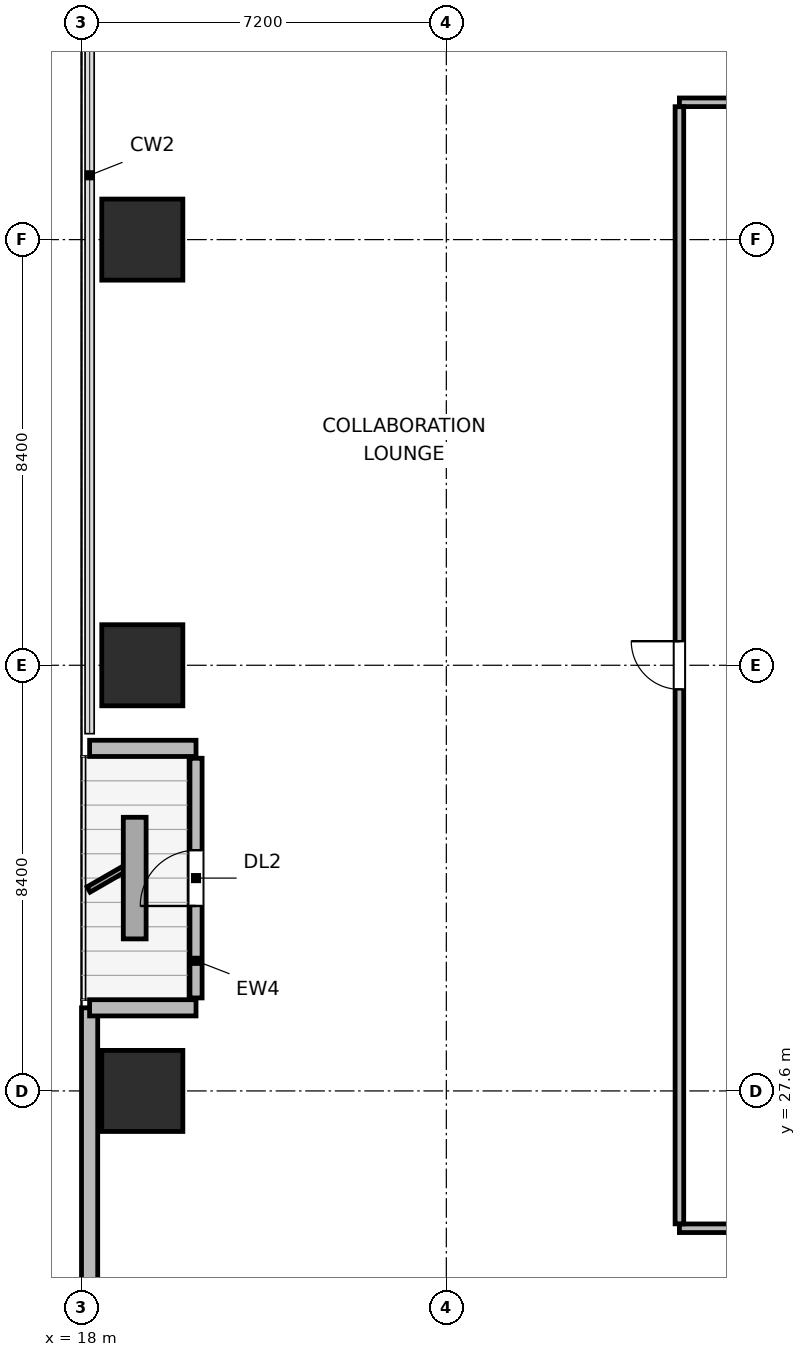
"""IFC4 building model, lengths in metres.
Left out: names, types, materials, properties, quantities, classifications, styles, units other than length and angle.
Written with IfcOpenShell. Run it as: python <this file> out.ifc"""

import sys

from ifc_helpers import new_model, si_unit, direction, frame, frame_2d, origin, origin_2d, place, context, subcontext, project, spatial, rectangle, extrude, element, fill, save


model = new_model("IFC4")
c1 = context("Model", 3, precision=1e-05, world=origin(), true_north=direction((0.0, 1.0)))
c2 = subcontext(c1, "Body", "Model", "MODEL_VIEW")
j1 = project(units=[si_unit("LENGTHUNIT", "METRE"), si_unit("PLANEANGLEUNIT", "RADIAN")], contexts=[c1])
p1 = place(None, origin())
s1 = spatial("IfcSite", under=j1, at=p1, CompositionType="ELEMENT")
p2 = place(p1, origin())
s2 = spatial("IfcBuilding", under=s1, at=p2, CompositionType="ELEMENT")
p3 = place(p2, frame((0.0, 0.0, 45.0)))
s3 = spatial("IfcBuildingStorey", under=s2, at=p3, CompositionType="ELEMENT", Elevation=45.0)
for number, where, z_axis, x_axis in (
    (1, (19.2, 27.6, 0.0), (0.0, 0.0, 1.0), (1.0, 0.0, 0.0)),
    (2, (19.2, 36.0, 0.0), (0.0, 0.0, 1.0), (1.0, 0.0, 0.0)),
    (3, (19.2, 44.4, 0.0), (0.0, 0.0, 1.0), (1.0, 0.0, 0.0)),
):
    element("IfcColumn", number, at=place(p3, frame(where, z_axis=z_axis, x_axis=x_axis)), inside=s3, PredefinedType="COLUMN", context=c2, shape_type="SweptSolid", body=[
        extrude(rectangle(XDim=1.6, YDim=1.6, at=origin_2d()), origin(), (0.0, 0.0, 1.0), 3.9),
    ])
p4 = place(p3, frame((18.16, 15.021, 0.0), z_axis=(0.0, 0.0, 1.0), x_axis=(0.0, 1.0, 0.0)))
e4 = element("IfcWall", 4, at=p4, inside=s3, PredefinedType="SOLIDWALL", context=c2, shape_type="SweptSolid", body=[
    extrude(rectangle(XDim=14.219, YDim=0.32, at=frame_2d((7.109, 0.0))), origin(), (0.0, 0.0, 1.0), 3.64),
])
p5 = place(p3, frame((18.16, 29.24, 0.0), z_axis=(0.0, 0.0, 1.0), x_axis=(1.0, 0.0, 0.0)))
e5 = element("IfcWall", 5, at=p5, inside=s3, PredefinedType="SOLIDWALL", context=c2, shape_type="SweptSolid", body=[
    extrude(rectangle(XDim=2.1, YDim=0.32, at=frame_2d((1.05, 0.0))), origin(), (0.0, 0.0, 1.0), 2.875),
])
p6 = place(p3, frame((20.26, 29.435, 0.0), z_axis=(0.0, 0.0, 1.0), x_axis=(0.0, 1.0, 0.0)))
e6 = element("IfcWall", 6, at=p6, inside=s3, PredefinedType="SOLIDWALL", context=c2, shape_type="SweptSolid", body=[
    extrude(rectangle(XDim=4.73, YDim=0.24, at=frame_2d((2.365, 0.0))), origin(), (0.0, 0.0, 1.0), 3.162),
])
p7 = place(p6, frame((1.815, 0.0, 0.0)))
e7 = element("IfcOpeningElement", 7, at=p7, cuts=e6, PredefinedType="OPENING", context=c2, shape_type="SweptSolid", body=[
    extrude(rectangle(XDim=1.1, YDim=2.04, at=frame_2d((0.55, 1.02))), frame((0.0, 0.13, 0.0), z_axis=(0.0, -1.0, 0.0), x_axis=(1.0, 0.0, 0.0)), (0.0, 0.0, 1.0), 0.26),
])
p8 = place(p3, frame((20.26, 34.36, 0.0), z_axis=(0.0, 0.0, 1.0), x_axis=(-1.0, 0.0, 0.0)))
e8 = element("IfcWall", 8, at=p8, inside=s3, PredefinedType="SOLIDWALL", context=c2, shape_type="SweptSolid", body=[
    extrude(rectangle(XDim=2.1, YDim=0.32, at=frame_2d((1.05, 0.0))), origin(), (0.0, 0.0, 1.0), 2.875),
])
p9 = place(p3, frame((29.8, 24.89, 0.0), z_axis=(0.0, 0.0, 1.0), x_axis=(1.0, 0.0, 0.0)))
e9 = element("IfcWall", 9, at=p9, inside=s3, PredefinedType="PARTITIONING", context=c2, shape_type="SweptSolid", body=[
    extrude(rectangle(XDim=36.4, YDim=0.17, at=frame_2d((18.2, 0.0))), origin(), (0.0, 0.0, 1.0), 3.64),
])
p10 = place(p9, frame((2.555, 0.0, 0.0)))
e10 = element("IfcOpeningElement", 10, at=p10, cuts=e9, PredefinedType="OPENING", context=c2, shape_type="SweptSolid", body=[
    extrude(rectangle(XDim=0.95, YDim=2.04, at=frame_2d((0.475, 1.02))), frame((0.0, 0.095, 0.0), z_axis=(0.0, -1.0, 0.0), x_axis=(1.0, 0.0, 0.0)), (0.0, 0.0, 1.0), 0.19),
])
p11 = place(p9, frame((8.01, 0.0, 0.0)))
e11 = element("IfcOpeningElement", 11, at=p11, cuts=e9, PredefinedType="OPENING", context=c2, shape_type="SweptSolid", body=[
    extrude(rectangle(XDim=0.95, YDim=2.04, at=frame_2d((0.475, 1.02))), frame((0.0, 0.095, 0.0), z_axis=(0.0, -1.0, 0.0), x_axis=(1.0, 0.0, 0.0)), (0.0, 0.0, 1.0), 0.19),
])
p12 = place(p9, frame((13.18, 0.0, 0.0)))
e12 = element("IfcOpeningElement", 12, at=p12, cuts=e9, PredefinedType="OPENING", context=c2, shape_type="SweptSolid", body=[
    extrude(rectangle(XDim=0.95, YDim=2.04, at=frame_2d((0.475, 1.02))), frame((0.0, 0.095, 0.0), z_axis=(0.0, -1.0, 0.0), x_axis=(1.0, 0.0, 0.0)), (0.0, 0.0, 1.0), 0.19),
])
p13 = place(p9, frame((18.04, 0.0, 0.0)))
e13 = element("IfcOpeningElement", 13, at=p13, cuts=e9, PredefinedType="OPENING", context=c2, shape_type="SweptSolid", body=[
    extrude(rectangle(XDim=0.95, YDim=2.04, at=frame_2d((0.475, 1.02))), frame((0.0, 0.095, 0.0), z_axis=(0.0, -1.0, 0.0), x_axis=(1.0, 0.0, 0.0)), (0.0, 0.0, 1.0), 0.19),
])
p14 = place(p9, frame((22.585, 0.0, 0.0)))
e14 = element("IfcOpeningElement", 14, at=p14, cuts=e9, PredefinedType="OPENING", context=c2, shape_type="SweptSolid", body=[
    extrude(rectangle(XDim=0.95, YDim=2.04, at=frame_2d((0.475, 1.02))), frame((0.0, 0.095, 0.0), z_axis=(0.0, -1.0, 0.0), x_axis=(1.0, 0.0, 0.0)), (0.0, 0.0, 1.0), 0.19),
])
p15 = place(p9, frame((27.44, 0.0, 0.0)))
e15 = element("IfcOpeningElement", 15, at=p15, cuts=e9, PredefinedType="OPENING", context=c2, shape_type="SweptSolid", body=[
    extrude(rectangle(XDim=0.95, YDim=2.04, at=frame_2d((0.475, 1.02))), frame((0.0, 0.095, 0.0), z_axis=(0.0, -1.0, 0.0), x_axis=(1.0, 0.0, 0.0)), (0.0, 0.0, 1.0), 0.19),
])
p16 = place(p9, frame((32.895, 0.0, 0.0)))
e16 = element("IfcOpeningElement", 16, at=p16, cuts=e9, PredefinedType="OPENING", context=c2, shape_type="SweptSolid", body=[
    extrude(rectangle(XDim=0.95, YDim=2.04, at=frame_2d((0.475, 1.02))), frame((0.0, 0.095, 0.0), z_axis=(0.0, -1.0, 0.0), x_axis=(1.0, 0.0, 0.0)), (0.0, 0.0, 1.0), 0.19),
])
p17 = place(p3, frame((29.8, 47.11, 0.0), z_axis=(0.0, 0.0, 1.0), x_axis=(1.0, 0.0, 0.0)))
e17 = element("IfcWall", 17, at=p17, inside=s3, PredefinedType="PARTITIONING", context=c2, shape_type="SweptSolid", body=[
    extrude(rectangle(XDim=36.4, YDim=0.17, at=frame_2d((18.2, 0.0))), origin(), (0.0, 0.0, 1.0), 3.64),
])
p18 = place(p17, frame((4.205, 0.0, 0.0)))
e18 = element("IfcOpeningElement", 18, at=p18, cuts=e17, PredefinedType="OPENING", context=c2, shape_type="SweptSolid", body=[
    extrude(rectangle(XDim=0.95, YDim=2.04, at=frame_2d((0.475, 1.02))), frame((0.0, 0.095, 0.0), z_axis=(0.0, -1.0, 0.0), x_axis=(1.0, 0.0, 0.0)), (0.0, 0.0, 1.0), 0.19),
])
p19 = place(p17, frame((10.385, 0.0, 0.0)))
e19 = element("IfcOpeningElement", 19, at=p19, cuts=e17, PredefinedType="OPENING", context=c2, shape_type="SweptSolid", body=[
    extrude(rectangle(XDim=0.95, YDim=2.04, at=frame_2d((0.475, 1.02))), frame((0.0, 0.095, 0.0), z_axis=(0.0, -1.0, 0.0), x_axis=(1.0, 0.0, 0.0)), (0.0, 0.0, 1.0), 0.19),
])
p20 = place(p17, frame((17.005, 0.0, 0.0)))
e20 = element("IfcOpeningElement", 20, at=p20, cuts=e17, PredefinedType="OPENING", context=c2, shape_type="SweptSolid", body=[
    extrude(rectangle(XDim=0.95, YDim=2.04, at=frame_2d((0.475, 1.02))), frame((0.0, 0.095, 0.0), z_axis=(0.0, -1.0, 0.0), x_axis=(1.0, 0.0, 0.0)), (0.0, 0.0, 1.0), 0.19),
])
p21 = place(p17, frame((24.755, 0.0, 0.0)))
e21 = element("IfcOpeningElement", 21, at=p21, cuts=e17, PredefinedType="OPENING", context=c2, shape_type="SweptSolid", body=[
    extrude(rectangle(XDim=0.95, YDim=2.04, at=frame_2d((0.475, 1.02))), frame((0.0, 0.095, 0.0), z_axis=(0.0, -1.0, 0.0), x_axis=(1.0, 0.0, 0.0)), (0.0, 0.0, 1.0), 0.19),
])
p22 = place(p17, frame((31.655, 0.0, 0.0)))
e22 = element("IfcOpeningElement", 22, at=p22, cuts=e17, PredefinedType="OPENING", context=c2, shape_type="SweptSolid", body=[
    extrude(rectangle(XDim=0.95, YDim=2.04, at=frame_2d((0.475, 1.02))), frame((0.0, 0.095, 0.0), z_axis=(0.0, -1.0, 0.0), x_axis=(1.0, 0.0, 0.0)), (0.0, 0.0, 1.0), 0.19),
])
p23 = place(p3, frame((29.8, 24.977, 0.0), z_axis=(0.0, 0.0, 1.0), x_axis=(0.0, 1.0, 0.0)))
e23 = element("IfcWall", 23, at=p23, inside=s3, PredefinedType="PARTITIONING", context=c2, shape_type="SweptSolid", body=[
    extrude(rectangle(XDim=22.046, YDim=0.17, at=frame_2d((11.023, 0.0))), origin(), (0.0, 0.0, 1.0), 3.64),
])
p24 = place(p23, frame((10.548, 0.0, 0.0)))
e24 = element("IfcOpeningElement", 24, at=p24, cuts=e23, PredefinedType="OPENING", context=c2, shape_type="SweptSolid", body=[
    extrude(rectangle(XDim=0.95, YDim=2.04, at=frame_2d((0.475, 1.02))), frame((0.0, 0.095, 0.0), z_axis=(0.0, -1.0, 0.0), x_axis=(1.0, 0.0, 0.0)), (0.0, 0.0, 1.0), 0.19),
])
p25 = place(p7, origin())
e25 = element("IfcDoor", 25, at=p25, inside=s3, OperationType="SINGLE_SWING_LEFT", PredefinedType="DOOR", context=c2, shape_type="SweptSolid", body=[
    extrude(rectangle(XDim=1.1, YDim=2.04, at=frame_2d((0.55, 1.02))), frame((0.0, 0.025, 0.0), z_axis=(0.0, -1.0, 0.0), x_axis=(1.0, 0.0, 0.0)), (0.0, 0.0, 1.0), 0.05),
])
fill(e7, e25)
p26 = place(p24, origin())
e26 = element("IfcDoor", 26, at=p26, inside=s3, OperationType="SINGLE_SWING_RIGHT", PredefinedType="DOOR", context=c2, shape_type="SweptSolid", body=[
    extrude(rectangle(XDim=0.95, YDim=2.04, at=frame_2d((0.475, 1.02))), frame((0.0, 0.025, 0.0), z_axis=(0.0, -1.0, 0.0), x_axis=(1.0, 0.0, 0.0)), (0.0, 0.0, 1.0), 0.05),
])
fill(e24, e26)
save(model, sys.argv[1])
